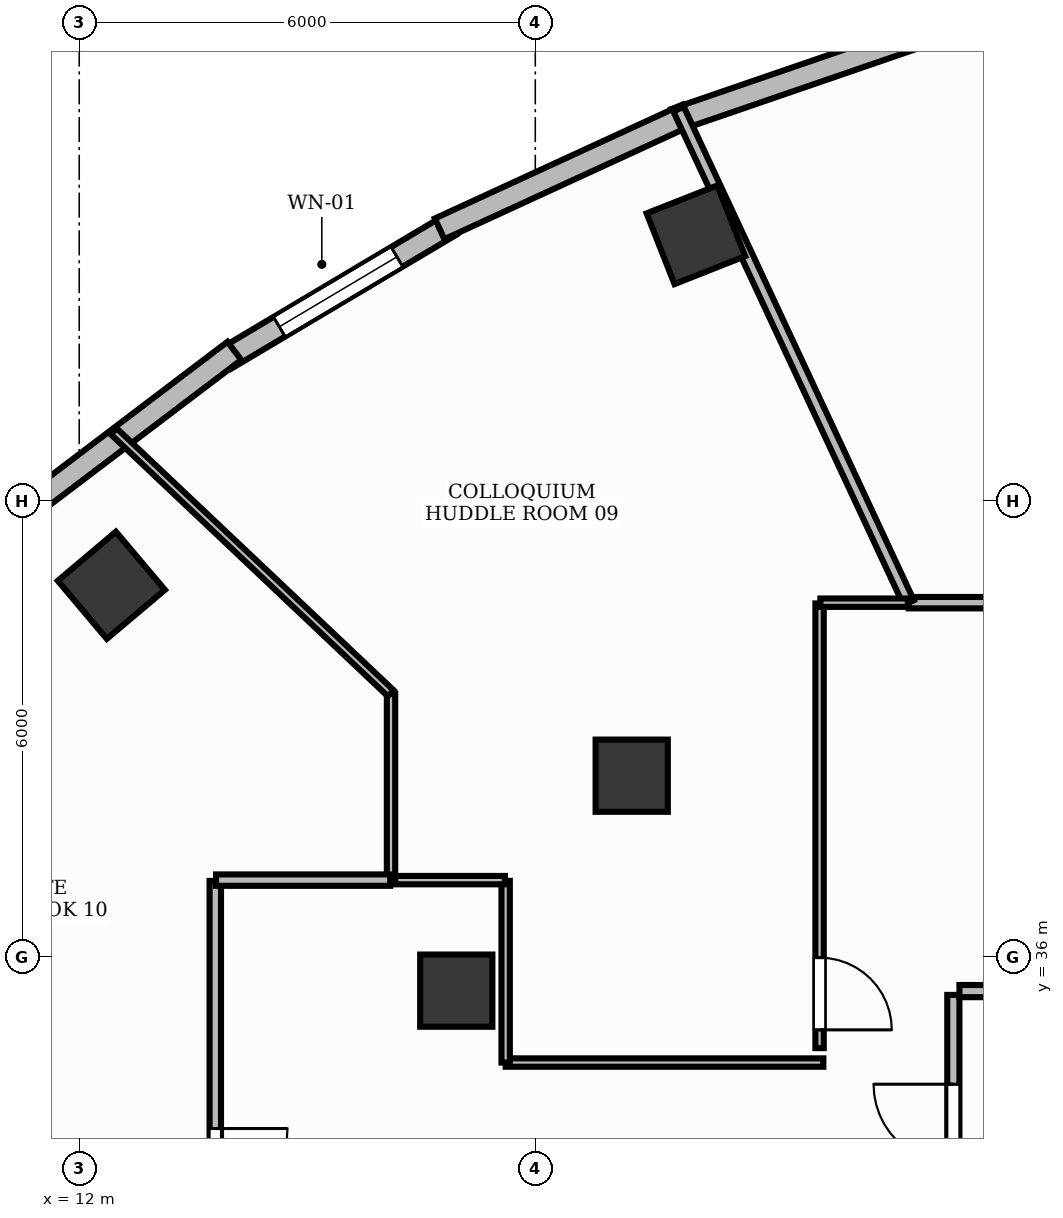
"""IFC4 building model, lengths in metres.
Left out: names, types, materials, properties, quantities, classifications, styles, units other than length and angle.
Written with IfcOpenShell. Run it as: python <this file> out.ifc"""

import sys

from ifc_helpers import new_model, si_unit, direction, frame, frame_2d, origin, origin_2d, place, context, subcontext, project, spatial, rectangle, extrude, element, fill, save


model = new_model("IFC4")
c1 = context("Model", 3, precision=1e-05, world=origin(), true_north=direction((0.0, 1.0)))
c2 = subcontext(c1, "Body", "Model", "MODEL_VIEW")
j1 = project(units=[si_unit("LENGTHUNIT", "METRE"), si_unit("PLANEANGLEUNIT", "RADIAN")], contexts=[c1])
p1 = place(None, origin())
s1 = spatial("IfcSite", under=j1, at=p1, CompositionType="ELEMENT")
p2 = place(p1, origin())
s2 = spatial("IfcBuilding", under=s1, at=p2, CompositionType="ELEMENT")
p3 = place(p2, frame((0.0, 0.0, 231.0)))
s3 = spatial("IfcBuildingStorey", under=s2, at=p3, CompositionType="ELEMENT", Elevation=231.0)
for number, where, z_axis, x_axis in (
    (1, (20.113, 45.5, -0.0), (0.0, 0.0, 1.0), (0.93, 0.367, 0.0)),
    (2, (12.423, 40.889, -0.0), (0.0, 0.0, 1.0), (0.764, 0.645, 0.0)),
):
    element("IfcColumn", number, at=place(p3, frame(where, z_axis=z_axis, x_axis=x_axis)), inside=s3, PredefinedType="COLUMN", context=c2, shape_type="SweptSolid", body=[
        extrude(rectangle(XDim=1.0, YDim=1.0, at=origin_2d()), origin(), (0.0, 0.0, 1.0), 3.901),
    ])
for number, where, z_axis, x_axis in (
    (3, (19.268, 38.384, -0.0), (0.0, 0.0, 1.0), (1.0, 0.0, 0.0)),
    (4, (16.96, 35.556, -0.0), (0.0, 0.0, 1.0), (1.0, 0.0, 0.0)),
):
    element("IfcColumn", number, at=place(p3, frame(where, z_axis=z_axis, x_axis=x_axis)), inside=s3, PredefinedType="COLUMN", context=c2, shape_type="SweptSolid", body=[
        extrude(rectangle(XDim=0.95, YDim=0.95, at=origin_2d()), origin(), (0.0, 0.0, 1.0), 3.901),
    ])
p4 = place(p3, frame((16.889, 45.632, 0.0), z_axis=(0.0, 0.0, 1.0), x_axis=(-0.859459434124, -0.511203952543, 0.0)))
e5 = element("IfcWall", 5, at=p4, inside=s3, PredefinedType="STANDARD", context=c2, shape_type="SweptSolid", body=[
    extrude(rectangle(XDim=3.45, YDim=0.3, at=frame_2d((1.725, 0.0))), origin(), (0.0, 0.0, 1.0), 3.9),
])
p5 = place(p4, frame((0.825, 0.0, 0.9)))
e6 = element("IfcOpeningElement", 6, at=p5, cuts=e5, PredefinedType="OPENING", context=c2, shape_type="SweptSolid", body=[
    extrude(rectangle(XDim=1.8, YDim=2.1, at=frame_2d((0.9, 1.05))), frame((0.0, 0.165, 0.0), z_axis=(0.0, -1.0, 0.0), x_axis=(1.0, 0.0, 0.0)), (0.0, 0.0, 1.0), 0.33),
])
p6 = place(p3, frame((23.309, 48.205, 0.0), z_axis=(0.0, 0.0, 1.0), x_axis=(-0.945722383555, -0.32497565023, 0.0)))
e7 = element("IfcWall", 7, at=p6, inside=s3, PredefinedType="STANDARD", context=c2, shape_type="SweptSolid", body=[
    extrude(rectangle(XDim=3.67, YDim=0.3, at=frame_2d((1.835, 0.0))), origin(), (0.0, 0.0, 1.0), 3.9),
])
p7 = place(p3, frame((20.0, 47.077, 0.0), z_axis=(0.0, 0.0, 1.0), x_axis=(-0.908506474671, -0.417870776055, 0.0)))
e8 = element("IfcWall", 8, at=p7, inside=s3, PredefinedType="STANDARD", context=c2, shape_type="SweptSolid", body=[
    extrude(rectangle(XDim=3.587, YDim=0.3, at=frame_2d((1.793, 0.0))), origin(), (0.0, 0.0, 1.0), 3.9),
])
p8 = place(p3, frame((14.041, 43.973, 0.0), z_axis=(0.0, 0.0, 1.0), x_axis=(-0.796917512891, -0.604088137317, 0.0)))
e9 = element("IfcWall", 9, at=p8, inside=s3, PredefinedType="STANDARD", context=c2, shape_type="SweptSolid", body=[
    extrude(rectangle(XDim=3.385, YDim=0.3, at=frame_2d((1.693, 0.0))), origin(), (0.0, 0.0, 1.0), 3.9),
])
p9 = place(p3, frame((23.5, 32.1, 0.0), z_axis=(0.0, 0.0, 1.0), x_axis=(0.0, 1.0, 0.0)))
e10 = element("IfcWall", 10, at=p9, inside=s3, PredefinedType="PARTITIONING", context=c2, shape_type="SweptSolid", body=[
    extrude(rectangle(XDim=3.4, YDim=0.16, at=frame_2d((1.7, 0.0))), origin(), (0.0, 0.0, 1.0), 2.91),
])
p10 = place(p9, frame((1.175, 0.0, 0.0)))
e11 = element("IfcOpeningElement", 11, at=p10, cuts=e10, PredefinedType="OPENING", context=c2, shape_type="SweptSolid", body=[
    extrude(rectangle(XDim=1.05, YDim=2.15, at=frame_2d((0.525, 1.075))), frame((0.0, 0.095, 0.0), z_axis=(0.0, -1.0, 0.0), x_axis=(1.0, 0.0, 0.0)), (0.0, 0.0, 1.0), 0.19),
])
p11 = place(p3, frame((23.58, 35.55, 0.0), z_axis=(0.0, 0.0, 1.0), x_axis=(1.0, 0.0, 0.0)))
e12 = element("IfcWall", 12, at=p11, inside=s3, PredefinedType="PARTITIONING", context=c2, shape_type="SweptSolid", body=[
    extrude(rectangle(XDim=2.12, YDim=0.16, at=frame_2d((1.06, 0.0))), origin(), (0.0, 0.0, 1.0), 2.91),
])
p12 = place(p3, frame((33.611, 40.66, 0.0), z_axis=(0.0, 0.0, 1.0), x_axis=(-1.0, 0.0, 0.0)))
e13 = element("IfcWall", 13, at=p12, inside=s3, PredefinedType="PARTITIONING", context=c2, shape_type="SweptSolid", body=[
    extrude(rectangle(XDim=10.698, YDim=0.15, at=frame_2d((5.349, 0.0))), origin(), (0.0, 0.0, 1.0), 2.91),
])
p13 = place(p12, frame((0.24, 0.0, 0.0)))
e14 = element("IfcOpeningElement", 14, at=p13, cuts=e13, PredefinedType="OPENING", context=c2, shape_type="SweptSolid", body=[
    extrude(rectangle(XDim=0.95, YDim=2.15, at=frame_2d((0.475, 1.075))), frame((0.0, 0.09, 0.0), z_axis=(0.0, -1.0, 0.0), x_axis=(1.0, 0.0, 0.0)), (0.0, 0.0, 1.0), 0.18),
])
p14 = place(p3, frame((21.74, 40.65, 0.0), z_axis=(0.0, 0.0, 1.0), x_axis=(0.0, -1.0, 0.0)))
e15 = element("IfcWall", 15, at=p14, inside=s3, PredefinedType="MOVABLE", context=c2, shape_type="SweptSolid", body=[
    extrude(rectangle(XDim=5.85, YDim=0.11, at=frame_2d((2.925, 0.0))), origin(), (0.0, 0.0, 1.0), 2.91),
])
p15 = place(p14, frame((4.66, 0.0, 0.0)))
e16 = element("IfcOpeningElement", 16, at=p15, cuts=e15, PredefinedType="OPENING", context=c2, shape_type="SweptSolid", body=[
    extrude(rectangle(XDim=0.95, YDim=2.15, at=frame_2d((0.475, 1.075))), frame((0.0, 0.07, 0.0), z_axis=(0.0, -1.0, 0.0), x_axis=(1.0, 0.0, 0.0)), (0.0, 0.0, 1.0), 0.14),
])
p16 = place(p3, frame((13.79, 37.0, 0.0), z_axis=(0.0, 0.0, 1.0), x_axis=(0.0, -1.0, 0.0)))
e17 = element("IfcWall", 17, at=p16, inside=s3, PredefinedType="PARTITIONING", context=c2, shape_type="SweptSolid", body=[
    extrude(rectangle(XDim=4.448, YDim=0.15, at=frame_2d((2.224, 0.0))), origin(), (0.0, 0.0, 1.0), 2.91),
])
p17 = place(p16, frame((3.258, 0.0, 0.0)))
e18 = element("IfcOpeningElement", 18, at=p17, cuts=e17, PredefinedType="OPENING", context=c2, shape_type="SweptSolid", body=[
    extrude(rectangle(XDim=0.95, YDim=2.15, at=frame_2d((0.475, 1.075))), frame((0.0, 0.09, 0.0), z_axis=(0.0, -1.0, 0.0), x_axis=(1.0, 0.0, 0.0)), (0.0, 0.0, 1.0), 0.18),
])
p18 = place(p3, frame((22.913, 40.66, 0.0), z_axis=(0.0, 0.0, 1.0), x_axis=(-0.422622429436, 0.906305843597, 0.0)))
e19 = element("IfcWall", 19, at=p18, inside=s3, PredefinedType="PARTITIONING", context=c2, shape_type="SweptSolid", body=[
    extrude(rectangle(XDim=7.165, YDim=0.15, at=frame_2d((3.583, 0.0))), origin(), (0.0, 0.0, 1.0), 2.91),
])
p19 = place(p3, frame((22.902, 40.66, 0.0), z_axis=(0.0, 0.0, 1.0), x_axis=(-1.0, 0.0, 0.0)))
e20 = element("IfcWall", 20, at=p19, inside=s3, PredefinedType="MOVABLE", context=c2, shape_type="SweptSolid", body=[
    extrude(rectangle(XDim=1.152, YDim=0.11, at=frame_2d((0.576, 0.0))), origin(), (0.0, 0.0, 1.0), 2.91),
])
p20 = place(p3, frame((21.79, 34.61, 0.0), z_axis=(0.0, 0.0, 1.0), x_axis=(-1.0, 0.0, 0.0)))
e21 = element("IfcWall", 21, at=p20, inside=s3, PredefinedType="MOVABLE", context=c2, shape_type="SweptSolid", body=[
    extrude(rectangle(XDim=4.18, YDim=0.11, at=frame_2d((2.09, 0.0))), origin(), (0.0, 0.0, 1.0), 2.91),
])
p21 = place(p3, frame((17.61, 34.61, 0.0), z_axis=(0.0, 0.0, 1.0), x_axis=(0.0, 1.0, 0.0)))
e22 = element("IfcWall", 22, at=p21, inside=s3, PredefinedType="MOVABLE", context=c2, shape_type="SweptSolid", body=[
    extrude(rectangle(XDim=2.39, YDim=0.11, at=frame_2d((1.195, 0.0))), origin(), (0.0, 0.0, 1.0), 2.91),
])
p22 = place(p3, frame((17.6, 37.01, 0.0), z_axis=(0.0, 0.0, 1.0), x_axis=(-1.0, 0.0, 0.0)))
e23 = element("IfcWall", 23, at=p22, inside=s3, PredefinedType="MOVABLE", context=c2, shape_type="SweptSolid", body=[
    extrude(rectangle(XDim=1.498, YDim=0.11, at=frame_2d((0.749, 0.0))), origin(), (0.0, 0.0, 1.0), 2.91),
])
p23 = place(p3, frame((16.102, 37.01, 0.0), z_axis=(0.0, 0.0, 1.0), x_axis=(0.0, 1.0, 0.0)))
e24 = element("IfcWall", 24, at=p23, inside=s3, PredefinedType="MOVABLE", context=c2, shape_type="SweptSolid", body=[
    extrude(rectangle(XDim=2.449, YDim=0.11, at=frame_2d((1.225, 0.0))), origin(), (0.0, 0.0, 1.0), 2.91),
])
p24 = place(p3, frame((16.098, 39.469, 0.0), z_axis=(0.0, 0.0, 1.0), x_axis=(-0.72659054889, 0.687070719987, 0.0)))
e25 = element("IfcWall", 25, at=p24, inside=s3, PredefinedType="MOVABLE", context=c2, shape_type="SweptSolid", body=[
    extrude(rectangle(XDim=5.016, YDim=0.11, at=frame_2d((2.508, 0.0))), origin(), (0.0, 0.0, 1.0), 2.91),
])
p25 = place(p3, frame((16.092, 37.01, 0.0), z_axis=(0.0, 0.0, 1.0), x_axis=(-1.0, 0.0, 0.0)))
e26 = element("IfcWall", 26, at=p25, inside=s3, PredefinedType="PARTITIONING", context=c2, shape_type="SweptSolid", body=[
    extrude(rectangle(XDim=2.292, YDim=0.15, at=frame_2d((1.146, 0.0))), origin(), (0.0, 0.0, 1.0), 2.91),
])
p26 = place(p5, origin())
e27 = element("IfcWindow", 27, at=p26, inside=s3, PartitioningType="SINGLE_PANEL", PredefinedType="WINDOW", context=c2, shape_type="SweptSolid", body=[
    extrude(rectangle(XDim=1.8, YDim=2.1, at=frame_2d((0.9, 1.05))), frame((0.0, 0.03, 0.0), z_axis=(0.0, -1.0, 0.0), x_axis=(1.0, 0.0, 0.0)), (0.0, 0.0, 1.0), 0.06),
])
fill(e6, e27)
p27 = place(p10, origin())
e28 = element("IfcDoor", 28, at=p27, inside=s3, OperationType="SINGLE_SWING_RIGHT", PredefinedType="DOOR", context=c2, shape_type="SweptSolid", body=[
    extrude(rectangle(XDim=1.05, YDim=2.15, at=frame_2d((0.525, 1.075))), frame((0.0, 0.025, 0.0), z_axis=(0.0, -1.0, 0.0), x_axis=(1.0, 0.0, 0.0)), (0.0, 0.0, 1.0), 0.05),
])
fill(e11, e28)
p28 = place(p15, origin())
e29 = element("IfcDoor", 29, at=p28, inside=s3, OperationType="SINGLE_SWING_RIGHT", PredefinedType="DOOR", context=c2, shape_type="SweptSolid", body=[
    extrude(rectangle(XDim=0.95, YDim=2.15, at=frame_2d((0.475, 1.075))), frame((0.0, 0.025, 0.0), z_axis=(0.0, -1.0, 0.0), x_axis=(1.0, 0.0, 0.0)), (0.0, 0.0, 1.0), 0.05),
])
fill(e16, e29)
p29 = place(p17, origin())
e30 = element("IfcDoor", 30, at=p29, inside=s3, OperationType="SINGLE_SWING_LEFT", PredefinedType="DOOR", context=c2, shape_type="SweptSolid", body=[
    extrude(rectangle(XDim=0.95, YDim=2.15, at=frame_2d((0.475, 1.075))), frame((0.0, 0.025, 0.0), z_axis=(0.0, -1.0, 0.0), x_axis=(1.0, 0.0, 0.0)), (0.0, 0.0, 1.0), 0.05),
])
fill(e18, e30)
save(model, sys.argv[1])
